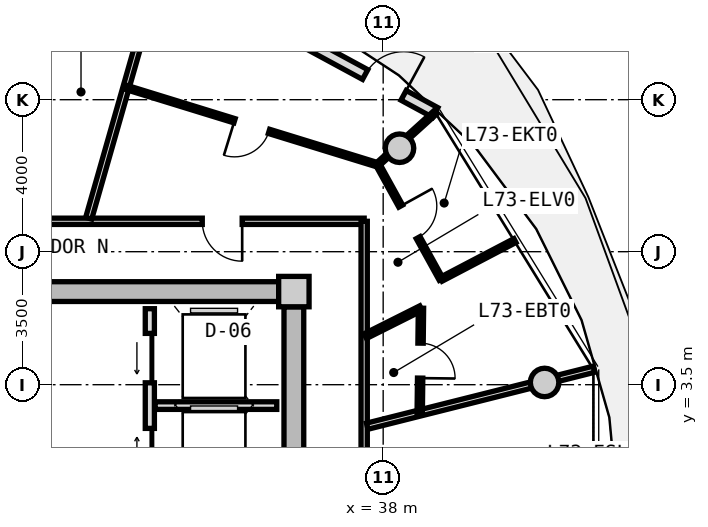
"""IFC4 building model, lengths in metres.
Left out: names, types, materials, properties, quantities, classifications, styles, units other than length and angle.
Written with IfcOpenShell. Run it as: python <this file> out.ifc"""

import sys

from ifc_helpers import new_model, si_unit, direction, frame, frame_2d, origin, origin_2d, place, context, subcontext, project, spatial, rectangle, circle, extrude, source, transform, mapped, element, fill, save


model = new_model("IFC4")
c1 = context("Model", 3, precision=1e-05, world=origin(), true_north=direction((0.0, 1.0)))
c2 = subcontext(c1, "Body", "Model", "MODEL_VIEW")
j1 = project(units=[si_unit("LENGTHUNIT", "METRE"), si_unit("PLANEANGLEUNIT", "RADIAN")], contexts=[c1])
p1 = place(None, origin())
s1 = spatial("IfcSite", under=j1, at=p1, CompositionType="ELEMENT")
p2 = place(p1, origin())
s2 = spatial("IfcBuilding", under=s1, at=p2, CompositionType="ELEMENT")
p3 = place(p2, frame((0.0, 0.0, 235.25)))
s3 = spatial("IfcBuildingStorey", under=s2, at=p3, CompositionType="ELEMENT", Elevation=235.25)
m1 = source(origin(), c2, "Body", "SweptSolid", [
    extrude(rectangle(XDim=0.8, YDim=0.8, at=origin_2d()), origin(), (0.0, 0.0, 1.0), 3.05),
])
p4 = place(p3, frame((35.65, 5.95, 0.0), z_axis=(0.0, 0.0, 1.0), x_axis=(1.0, 0.0, 0.0)))
e1 = element("IfcColumn", 1, at=p4, inside=s3, PredefinedType="COLUMN", context=c2, shape_type="MappedRepresentation", body=[
    mapped(m1, transform((0.0, 0.0, 0.0), x_axis=(1.0, 0.0, 0.0), y_axis=(0.0, 1.0, 0.0), z_axis=(0.0, 0.0, 1.0), scale=1.0)),
])
m2 = source(origin(), c2, "Body", "SweptSolid", [
    extrude(rectangle(XDim=14.5, YDim=0.52, at=frame_2d((7.25, 0.0))), origin(), (0.0, 0.0, 1.0), 2.81),
])
p5 = place(p3, frame((20.75, 5.95, 0.0), z_axis=(0.0, 0.0, 1.0), x_axis=(1.0, 0.0, 0.0)))
e2 = element("IfcWall", 2, at=p5, inside=s3, PredefinedType="SHEAR", context=c2, shape_type="MappedRepresentation", body=[
    mapped(m2, transform((0.0, 0.0, 0.0), x_axis=(1.0, 0.0, 0.0), y_axis=(0.0, 1.0, 0.0), z_axis=(0.0, 0.0, 1.0), scale=1.0)),
])
m3 = source(origin(), c2, "Body", "SweptSolid", [
    extrude(rectangle(XDim=11.1, YDim=0.52, at=frame_2d((5.55, 0.0))), origin(), (0.0, 0.0, 1.0), 2.81),
])
p6 = place(p3, frame((35.65, 5.55, 0.0), z_axis=(0.0, 0.0, 1.0), x_axis=(0.0, -1.0, 0.0)))
e3 = element("IfcWall", 3, at=p6, inside=s3, PredefinedType="SHEAR", context=c2, shape_type="MappedRepresentation", body=[
    mapped(m3, transform((0.0, 0.0, 0.0), x_axis=(1.0, 0.0, 0.0), y_axis=(0.0, 1.0, 0.0), z_axis=(0.0, 0.0, 1.0), scale=1.0)),
])
p7 = place(p6, frame((5.65, 0.0, 0.0)))
e4 = element("IfcOpeningElement", 4, at=p7, cuts=e3, PredefinedType="OPENING", context=c2, shape_type="SweptSolid", body=[
    extrude(rectangle(XDim=1.2, YDim=2.15, at=frame_2d((0.6, 1.075))), frame((0.0, 0.27, 0.0), z_axis=(0.0, -1.0, 0.0), x_axis=(1.0, 0.0, 0.0)), (0.0, 0.0, 1.0), 0.54),
])
m4 = source(origin(), c2, "Body", "SweptSolid", [
    extrude(circle(Radius=0.375, at=origin_2d()), origin(), (0.0, 0.0, 1.0), 3.05),
])
for number, where, z_axis, x_axis in (
    (5, (42.247, 3.559, 0.0), (0.0, 0.0, 1.0), (1.0, 0.0, 0.0)),
    (6, (38.43, 9.723, 0.0), (0.0, 0.0, 1.0), (1.0, 0.0, 0.0)),
):
    element("IfcColumn", number, at=place(p3, frame(where, z_axis=z_axis, x_axis=x_axis)), inside=s3, PredefinedType="COLUMN", context=c2, shape_type="MappedRepresentation", body=[
        mapped(m4, transform((0.0, 0.0, 0.0), x_axis=(1.0, 0.0, 0.0), y_axis=(0.0, 1.0, 0.0), z_axis=(0.0, 0.0, 1.0), scale=1.0)),
    ])
m5 = source(origin(), c2, "Body", "SweptSolid", [
    extrude(rectangle(XDim=8.197, YDim=0.29, at=frame_2d((4.099, 0.0))), origin(), (0.0, 0.0, 1.0), 2.81),
])
p8 = place(p3, frame((32.162, 14.566, 0.0), z_axis=(0.0, 0.0, 1.0), x_axis=(0.879369910001, -0.476139224791, 0.0)))
e7 = element("IfcWall", 7, at=p8, inside=s3, PredefinedType="SOLIDWALL", context=c2, shape_type="MappedRepresentation", body=[
    mapped(m5, transform((0.0, 0.0, 0.0), x_axis=(1.0, 0.0, 0.0), y_axis=(0.0, 1.0, 0.0), z_axis=(0.0, 0.0, 1.0), scale=1.0)),
])
p9 = place(p8, frame((6.1, 0.0, 0.0)))
e8 = element("IfcOpeningElement", 8, at=p9, cuts=e7, PredefinedType="OPENING", context=c2, shape_type="SweptSolid", body=[
    extrude(rectangle(XDim=1.15, YDim=2.25, at=frame_2d((0.575, 1.125))), frame((0.0, 0.155, 0.0), z_axis=(0.0, -1.0, 0.0), x_axis=(1.0, 0.0, 0.0)), (0.0, 0.0, 1.0), 0.31),
])
p10 = place(p8, frame((0.85, 0.0, 0.85)))
e9 = element("IfcOpeningElement", 9, at=p10, cuts=e7, PredefinedType="OPENING", context=c2, shape_type="SweptSolid", body=[
    extrude(rectangle(XDim=1.2, YDim=1.5, at=frame_2d((0.6, 0.75))), frame((0.0, 0.155, 0.0), z_axis=(0.0, -1.0, 0.0), x_axis=(1.0, 0.0, 0.0)), (0.0, 0.0, 1.0), 0.31),
])
m6 = source(origin(), c2, "Body", "SweptSolid", [
    extrude(rectangle(XDim=5.0, YDim=0.24, at=frame_2d((2.5, 0.0))), origin(), (0.0, 0.0, 1.0), 2.795),
])
p11 = place(p3, frame((31.86, 0.5, 0.0), z_axis=(0.0, 0.0, 1.0), x_axis=(0.0, 1.0, 0.0)))
e10 = element("IfcWall", 10, at=p11, inside=s3, PredefinedType="PARTITIONING", context=c2, shape_type="MappedRepresentation", body=[
    mapped(m6, transform((0.0, 0.0, 0.0), x_axis=(1.0, 0.0, 0.0), y_axis=(0.0, 1.0, 0.0), z_axis=(0.0, 0.0, 1.0), scale=1.0)),
])
p12 = place(p11, frame((3.05, 0.0, 0.0)))
e11 = element("IfcOpeningElement", 11, at=p12, cuts=e10, PredefinedType="OPENING", context=c2, shape_type="SweptSolid", body=[
    extrude(rectangle(XDim=1.3, YDim=2.2, at=frame_2d((0.65, 1.1))), frame((0.0, 0.13, 0.0), z_axis=(0.0, -1.0, 0.0), x_axis=(1.0, 0.0, 0.0)), (0.0, 0.0, 1.0), 0.26),
])
p13 = place(p11, frame((0.55, 0.0, 0.0)))
e12 = element("IfcOpeningElement", 12, at=p13, cuts=e10, PredefinedType="OPENING", context=c2, shape_type="SweptSolid", body=[
    extrude(rectangle(XDim=1.3, YDim=2.2, at=frame_2d((0.65, 1.1))), frame((0.0, 0.13, 0.0), z_axis=(0.0, -1.0, 0.0), x_axis=(1.0, 0.0, 0.0)), (0.0, 0.0, 1.0), 0.26),
])
m7 = source(origin(), c2, "Body", "SweptSolid", [
    extrude(rectangle(XDim=3.2, YDim=0.2, at=frame_2d((1.6, 0.0))), origin(), (0.0, 0.0, 1.0), 2.795),
])
p14 = place(p3, frame((32.0, 2.95, 0.0), z_axis=(0.0, 0.0, 1.0), x_axis=(1.0, 0.0, 0.0)))
e13 = element("IfcWall", 13, at=p14, inside=s3, PredefinedType="PARTITIONING", context=c2, shape_type="MappedRepresentation", body=[
    mapped(m7, transform((0.0, 0.0, 0.0), x_axis=(1.0, 0.0, 0.0), y_axis=(0.0, 1.0, 0.0), z_axis=(0.0, 0.0, 1.0), scale=1.0)),
])
m8 = source(origin(), c2, "Body", "SweptSolid", [
    extrude(rectangle(XDim=8.58, YDim=0.165, at=frame_2d((4.29, 0.0))), origin(), (0.0, 0.0, 1.0), 2.795),
])
p15 = place(p3, frame((28.92, 7.8, 0.0), z_axis=(0.0, 0.0, 1.0), x_axis=(1.0, 0.0, 0.0)))
e14 = element("IfcWall", 14, at=p15, inside=s3, PredefinedType="PARTITIONING", context=c2, shape_type="MappedRepresentation", body=[
    mapped(m8, transform((0.0, 0.0, 0.0), x_axis=(1.0, 0.0, 0.0), y_axis=(0.0, 1.0, 0.0), z_axis=(0.0, 0.0, 1.0), scale=1.0)),
])
p16 = place(p15, frame((4.32, 0.0, 0.0)))
e15 = element("IfcOpeningElement", 15, at=p16, cuts=e14, PredefinedType="OPENING", context=c2, shape_type="SweptSolid", body=[
    extrude(rectangle(XDim=1.05, YDim=2.15, at=frame_2d((0.525, 1.075))), frame((0.0, 0.093, 0.0), z_axis=(0.0, -1.0, 0.0), x_axis=(1.0, 0.0, 0.0)), (0.0, 0.0, 1.0), 0.185),
])
m9 = source(origin(), c2, "Body", "SweptSolid", [
    extrude(rectangle(XDim=6.88, YDim=0.165, at=frame_2d((3.44, 0.0))), origin(), (0.0, 0.0, 1.0), 2.795),
])
p17 = place(p3, frame((37.5, 7.8, 0.0), z_axis=(0.0, 0.0, 1.0), x_axis=(0.0, -1.0, 0.0)))
e16 = element("IfcWall", 16, at=p17, inside=s3, PredefinedType="PARTITIONING", context=c2, shape_type="MappedRepresentation", body=[
    mapped(m9, transform((0.0, 0.0, 0.0), x_axis=(1.0, 0.0, 0.0), y_axis=(0.0, 1.0, 0.0), z_axis=(0.0, 0.0, 1.0), scale=1.0)),
])
m10 = source(origin(), c2, "Body", "SweptSolid", [
    extrude(rectangle(XDim=6.974, YDim=0.165, at=frame_2d((3.487, 0.0))), origin(), (0.0, 0.0, 1.0), 2.395),
])
p18 = place(p3, frame((30.251, 7.88, 0.0), z_axis=(0.0, 0.0, 1.0), x_axis=(0.274707256801, 0.961527910703, 0.0)))
e17 = element("IfcWall", 17, at=p18, inside=s3, PredefinedType="PARTITIONING", context=c2, shape_type="MappedRepresentation", body=[
    mapped(m10, transform((0.0, 0.0, 0.0), x_axis=(1.0, 0.0, 0.0), y_axis=(0.0, 1.0, 0.0), z_axis=(0.0, 0.0, 1.0), scale=1.0)),
])
m11 = source(origin(), c2, "Body", "SweptSolid", [
    extrude(rectangle(XDim=6.157, YDim=0.165, at=frame_2d((3.079, 0.0))), origin(), (0.0, 0.0, 1.0), 2.395),
])
p19 = place(p3, frame((37.58, 2.407, 0.0), z_axis=(0.0, 0.0, 1.0), x_axis=(0.969840867184, 0.243738984038, 0.0)))
e18 = element("IfcWall", 18, at=p19, inside=s3, PredefinedType="PARTITIONING", context=c2, shape_type="MappedRepresentation", body=[
    mapped(m11, transform((0.0, 0.0, 0.0), x_axis=(1.0, 0.0, 0.0), y_axis=(0.0, 1.0, 0.0), z_axis=(0.0, 0.0, 1.0), scale=1.0)),
])
m12 = source(origin(), c2, "Body", "SweptSolid", [
    extrude(rectangle(XDim=6.919, YDim=0.115, at=frame_2d((3.459, 0.0))), origin(), (0.0, 0.0, 1.0), 2.795),
])
p20 = place(p3, frame((37.849, 9.287, 0.0), z_axis=(0.0, 0.0, 1.0), x_axis=(-0.955678249072, 0.294413118341, 0.0)))
e19 = element("IfcWall", 19, at=p20, inside=s3, PredefinedType="PARTITIONING", context=c2, shape_type="MappedRepresentation", body=[
    mapped(m12, transform((0.0, 0.0, 0.0), x_axis=(1.0, 0.0, 0.0), y_axis=(0.0, 1.0, 0.0), z_axis=(0.0, 0.0, 1.0), scale=1.0)),
])
p21 = place(p20, frame((2.985, 0.0, 0.0)))
e20 = element("IfcOpeningElement", 20, at=p21, cuts=e19, PredefinedType="OPENING", context=c2, shape_type="SweptSolid", body=[
    extrude(rectangle(XDim=0.95, YDim=2.1, at=frame_2d((0.475, 1.05))), frame((0.0, 0.067, 0.0), z_axis=(0.0, -1.0, 0.0), x_axis=(1.0, 0.0, 0.0)), (0.0, 0.0, 1.0), 0.135),
])
m13 = source(origin(), c2, "Body", "SweptSolid", [
    extrude(rectangle(XDim=2.072, YDim=0.115, at=frame_2d((1.036, 0.0))), origin(), (0.0, 0.0, 1.0), 2.395),
])
p22 = place(p3, frame((37.849, 9.287, 0.0), z_axis=(0.0, 0.0, 1.0), x_axis=(0.741410125356, 0.671052178314, 0.0)))
e21 = element("IfcWall", 21, at=p22, inside=s3, PredefinedType="PARTITIONING", context=c2, shape_type="MappedRepresentation", body=[
    mapped(m13, transform((0.0, 0.0, 0.0), x_axis=(1.0, 0.0, 0.0), y_axis=(0.0, 1.0, 0.0), z_axis=(0.0, 0.0, 1.0), scale=1.0)),
])
m14 = source(origin(), c2, "Body", "SweptSolid", [
    extrude(rectangle(XDim=1.638, YDim=0.14, at=frame_2d((0.819, 0.0))), origin(), (0.0, 0.0, 1.0), 2.795),
])
p23 = place(p3, frame((37.53, 4.778, 0.0), z_axis=(0.0, 0.0, 1.0), x_axis=(0.893919977945, 0.448226586707, 0.0)))
e22 = element("IfcWall", 22, at=p23, inside=s3, PredefinedType="PARTITIONING", context=c2, shape_type="MappedRepresentation", body=[
    mapped(m14, transform((0.0, 0.0, 0.0), x_axis=(1.0, 0.0, 0.0), y_axis=(0.0, 1.0, 0.0), z_axis=(0.0, 0.0, 1.0), scale=1.0)),
])
m15 = source(origin(), c2, "Body", "SweptSolid", [
    extrude(rectangle(XDim=2.759, YDim=0.14, at=frame_2d((1.379, 0.0))), origin(), (0.0, 0.0, 1.0), 2.795),
])
p24 = place(p3, frame((38.995, 5.513, 0.0), z_axis=(0.0, 0.0, 1.0), x_axis=(-0.01194710728, -0.999928630767, 0.0)))
e23 = element("IfcWall", 23, at=p24, inside=s3, PredefinedType="PARTITIONING", context=c2, shape_type="MappedRepresentation", body=[
    mapped(m15, transform((0.0, 0.0, 0.0), x_axis=(1.0, 0.0, 0.0), y_axis=(0.0, 1.0, 0.0), z_axis=(0.0, 0.0, 1.0), scale=1.0)),
])
p25 = place(p24, frame((0.919, 0.0, 0.0)))
e24 = element("IfcOpeningElement", 24, at=p25, cuts=e23, PredefinedType="OPENING", context=c2, shape_type="SweptSolid", body=[
    extrude(rectangle(XDim=0.92, YDim=2.1, at=frame_2d((0.46, 1.05))), frame((0.0, 0.08, 0.0), z_axis=(0.0, -1.0, 0.0), x_axis=(1.0, 0.0, 0.0)), (0.0, 0.0, 1.0), 0.16),
])
m16 = source(origin(), c2, "Body", "SweptSolid", [
    extrude(rectangle(XDim=2.193, YDim=0.115, at=frame_2d((1.097, 0.0))), origin(), (0.0, 0.0, 1.0), 2.795),
])
p26 = place(p3, frame((39.525, 6.275, 0.0), z_axis=(0.0, 0.0, 1.0), x_axis=(0.885783595046, 0.464098505435, 0.0)))
e25 = element("IfcWall", 25, at=p26, inside=s3, PredefinedType="PARTITIONING", context=c2, shape_type="MappedRepresentation", body=[
    mapped(m16, transform((0.0, 0.0, 0.0), x_axis=(1.0, 0.0, 0.0), y_axis=(0.0, 1.0, 0.0), z_axis=(0.0, 0.0, 1.0), scale=1.0)),
])
m17 = source(origin(), c2, "Body", "SweptSolid", [
    extrude(rectangle(XDim=3.45, YDim=0.115, at=frame_2d((1.725, 0.0))), origin(), (0.0, 0.0, 1.0), 2.795),
])
p27 = place(p3, frame((39.525, 6.275, 0.0), z_axis=(0.0, 0.0, 1.0), x_axis=(-0.483659007882, 0.875256513312, 0.0)))
e26 = element("IfcWall", 26, at=p27, inside=s3, PredefinedType="PARTITIONING", context=c2, shape_type="MappedRepresentation", body=[
    mapped(m17, transform((0.0, 0.0, 0.0), x_axis=(1.0, 0.0, 0.0), y_axis=(0.0, 1.0, 0.0), z_axis=(0.0, 0.0, 1.0), scale=1.0)),
])
p28 = place(p27, frame((1.25, 0.0, 0.0)))
e27 = element("IfcOpeningElement", 27, at=p28, cuts=e26, PredefinedType="OPENING", context=c2, shape_type="SweptSolid", body=[
    extrude(rectangle(XDim=0.95, YDim=2.1, at=frame_2d((0.475, 1.05))), frame((0.0, 0.067, 0.0), z_axis=(0.0, -1.0, 0.0), x_axis=(1.0, 0.0, 0.0)), (0.0, 0.0, 1.0), 0.135),
])
m18 = source(origin(), c2, "Body", "SweptSolid", [
    extrude(rectangle(XDim=1.15, YDim=2.25, at=frame_2d((0.575, 1.125))), frame((0.0, 0.025, 0.0), z_axis=(0.0, -1.0, 0.0), x_axis=(1.0, 0.0, 0.0)), (0.0, 0.0, 1.0), 0.05),
])
p29 = place(p9, origin())
e28 = element("IfcDoor", 28, at=p29, inside=s3, OperationType="SINGLE_SWING_RIGHT", PredefinedType="DOOR", context=c2, shape_type="MappedRepresentation", body=[
    mapped(m18, transform((0.0, 0.0, 0.0), x_axis=(1.0, 0.0, 0.0), y_axis=(0.0, 1.0, 0.0), z_axis=(0.0, 0.0, 1.0), scale=1.0)),
])
fill(e8, e28)
m19 = source(origin(), c2, "Body", "SweptSolid", [
    extrude(rectangle(XDim=1.3, YDim=2.2, at=frame_2d((0.65, 1.1))), frame((0.0, 0.025, 0.0), z_axis=(0.0, -1.0, 0.0), x_axis=(1.0, 0.0, 0.0)), (0.0, 0.0, 1.0), 0.05),
])
p30 = place(p12, origin())
e29 = element("IfcDoor", 29, at=p30, inside=s3, OperationType="SLIDING_TO_LEFT", PredefinedType="DOOR", context=c2, shape_type="MappedRepresentation", body=[
    mapped(m19, transform((0.0, 0.0, 0.0), x_axis=(1.0, 0.0, 0.0), y_axis=(0.0, 1.0, 0.0), z_axis=(0.0, 0.0, 1.0), scale=1.0)),
])
fill(e11, e29)
p31 = place(p13, origin())
e30 = element("IfcDoor", 30, at=p31, inside=s3, OperationType="SLIDING_TO_RIGHT", PredefinedType="DOOR", context=c2, shape_type="MappedRepresentation", body=[
    mapped(m19, transform((0.0, 0.0, 0.0), x_axis=(1.0, 0.0, 0.0), y_axis=(0.0, 1.0, 0.0), z_axis=(0.0, 0.0, 1.0), scale=1.0)),
])
fill(e12, e30)
m20 = source(origin(), c2, "Body", "SweptSolid", [
    extrude(rectangle(XDim=1.05, YDim=2.15, at=frame_2d((0.525, 1.075))), frame((0.0, 0.025, 0.0), z_axis=(0.0, -1.0, 0.0), x_axis=(1.0, 0.0, 0.0)), (0.0, 0.0, 1.0), 0.05),
])
p32 = place(p16, frame((1.05, 0.0, 0.0), z_axis=(0.0, 0.0, 1.0), x_axis=(-1.0, 0.0, 0.0)))
e31 = element("IfcDoor", 31, at=p32, inside=s3, OperationType="SINGLE_SWING_LEFT", PredefinedType="DOOR", context=c2, shape_type="MappedRepresentation", body=[
    mapped(m20, transform((0.0, 0.0, 0.0), x_axis=(1.0, 0.0, 0.0), y_axis=(0.0, 1.0, 0.0), z_axis=(0.0, 0.0, 1.0), scale=1.0)),
])
fill(e15, e31)
m21 = source(origin(), c2, "Body", "SweptSolid", [
    extrude(rectangle(XDim=0.92, YDim=2.1, at=frame_2d((0.46, 1.05))), frame((0.0, 0.025, 0.0), z_axis=(0.0, -1.0, 0.0), x_axis=(1.0, 0.0, 0.0)), (0.0, 0.0, 1.0), 0.05),
])
p33 = place(p25, origin())
e32 = element("IfcDoor", 32, at=p33, inside=s3, OperationType="SINGLE_SWING_RIGHT", PredefinedType="DOOR", context=c2, shape_type="MappedRepresentation", body=[
    mapped(m21, transform((0.0, 0.0, 0.0), x_axis=(1.0, 0.0, 0.0), y_axis=(0.0, 1.0, 0.0), z_axis=(0.0, 0.0, 1.0), scale=1.0)),
])
fill(e24, e32)
m22 = source(origin(), c2, "Body", "SweptSolid", [
    extrude(rectangle(XDim=0.95, YDim=2.1, at=frame_2d((0.475, 1.05))), frame((0.0, 0.025, 0.0), z_axis=(0.0, -1.0, 0.0), x_axis=(1.0, 0.0, 0.0)), (0.0, 0.0, 1.0), 0.05),
])
p34 = place(p28, frame((0.95, 0.0, 0.0), z_axis=(0.0, 0.0, 1.0), x_axis=(-1.0, 0.0, 0.0)))
e33 = element("IfcDoor", 33, at=p34, inside=s3, OperationType="SINGLE_SWING_LEFT", PredefinedType="DOOR", context=c2, shape_type="MappedRepresentation", body=[
    mapped(m22, transform((0.0, 0.0, 0.0), x_axis=(1.0, 0.0, 0.0), y_axis=(0.0, 1.0, 0.0), z_axis=(0.0, 0.0, 1.0), scale=1.0)),
])
fill(e27, e33)
p35 = place(p21, origin())
e34 = element("IfcDoor", 34, at=p35, inside=s3, OperationType="SINGLE_SWING_RIGHT", PredefinedType="DOOR", context=c2, shape_type="MappedRepresentation", body=[
    mapped(m22, transform((0.0, 0.0, 0.0), x_axis=(1.0, 0.0, 0.0), y_axis=(0.0, 1.0, 0.0), z_axis=(0.0, 0.0, 1.0), scale=1.0)),
])
fill(e20, e34)
save(model, sys.argv[1])
